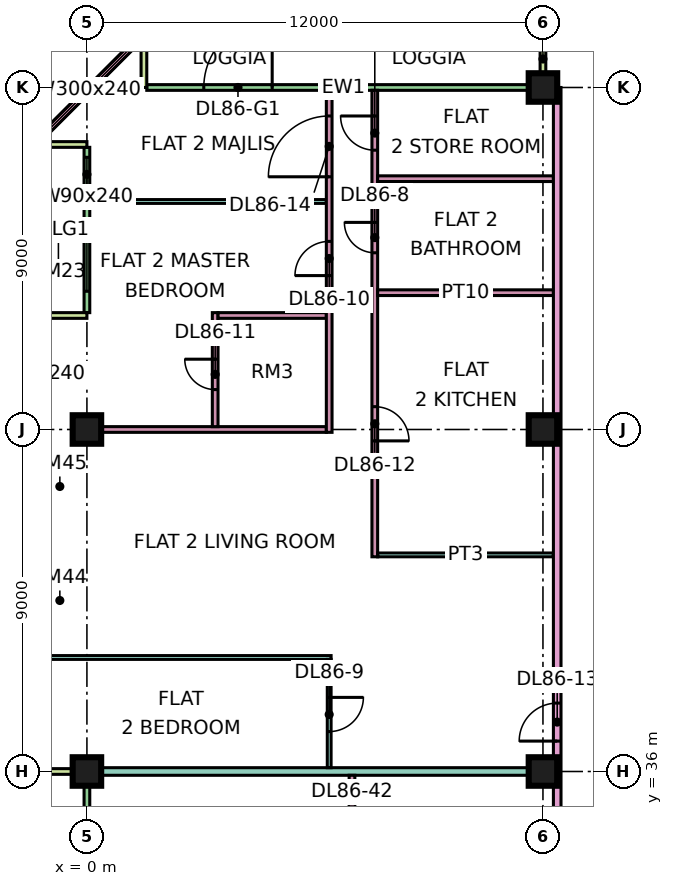
"""IFC4 building model, lengths in metres.
Left out: names, types, materials, properties, quantities, classifications, styles, units other than length and angle.
Written with IfcOpenShell. Run it as: python <this file> out.ifc"""

import sys

from ifc_helpers import new_model, si_unit, direction, frame, frame_2d, origin, origin_2d, place, context, subcontext, project, spatial, rectangle, extrude, element, fill, save


model = new_model("IFC4")
c1 = context("Model", 3, precision=1e-05, world=origin(), true_north=direction((0.0, 1.0)))
c2 = subcontext(c1, "Body", "Model", "MODEL_VIEW")
j1 = project(units=[si_unit("LENGTHUNIT", "METRE"), si_unit("PLANEANGLEUNIT", "RADIAN")], contexts=[c1])
p1 = place(None, origin())
s1 = spatial("IfcSite", under=j1, at=p1, CompositionType="ELEMENT")
p2 = place(p1, origin())
s2 = spatial("IfcBuilding", under=s1, at=p2, CompositionType="ELEMENT")
p3 = place(p2, frame((0.0, 0.0, 368.9)))
s3 = spatial("IfcBuildingStorey", under=s2, at=p3, CompositionType="ELEMENT", Elevation=368.9)
p4 = place(p3, frame((0.0, 36.0, 0.0), z_axis=(0.0, 0.0, 1.0), x_axis=(1.0, 0.0, 0.0)))
e1 = element("IfcColumn", 1, at=p4, inside=s3, PredefinedType="COLUMN", context=c2, shape_type="SweptSolid", body=[
    extrude(rectangle(XDim=0.75, YDim=0.75, at=origin_2d()), origin(), (0.0, 0.0, 1.0), 3.75),
])
p5 = place(p3, frame((0.0, 45.0, 0.0), z_axis=(0.0, 0.0, 1.0), x_axis=(1.0, 0.0, 0.0)))
e2 = element("IfcColumn", 2, at=p5, inside=s3, PredefinedType="COLUMN", context=c2, shape_type="SweptSolid", body=[
    extrude(rectangle(XDim=0.75, YDim=0.75, at=origin_2d()), origin(), (0.0, 0.0, 1.0), 3.75),
])
for number, where, z_axis, x_axis in (
    (3, (12.0, 36.0, 0.0), (0.0, 0.0, 1.0), (1.0, 0.0, 0.0)),
    (4, (12.0, 45.0, 0.0), (0.0, 0.0, 1.0), (1.0, 0.0, 0.0)),
    (5, (12.0, 54.0, 0.0), (0.0, 0.0, 1.0), (1.0, 0.0, 0.0)),
):
    element("IfcColumn", number, at=place(p3, frame(where, z_axis=z_axis, x_axis=x_axis)), inside=s3, PredefinedType="COLUMN", context=c2, shape_type="SweptSolid", body=[
        extrude(rectangle(XDim=0.75, YDim=0.75, at=origin_2d()), origin(), (0.0, 0.0, 1.0), 3.75),
    ])
p6 = place(p3, frame((11.925, 54.0, 0.0), z_axis=(0.0, 0.0, 1.0), x_axis=(-1.0, 0.0, 0.0)))
e6 = element("IfcWall", 6, at=p6, inside=s3, PredefinedType="SOLIDWALL", context=c2, shape_type="SweptSolid", body=[
    extrude(rectangle(XDim=10.35, YDim=0.15, at=frame_2d((5.175, 0.0))), origin(), (0.0, 0.0, 1.0), 3.35),
])
p7 = place(p6, frame((7.05, 0.0, 0.0)))
e7 = element("IfcOpeningElement", 7, at=p7, cuts=e6, PredefinedType="OPENING", context=c2, shape_type="SweptSolid", body=[
    extrude(rectangle(XDim=1.8, YDim=2.4, at=frame_2d((0.9, 1.2))), frame((0.0, 0.085, 0.0), z_axis=(0.0, -1.0, 0.0), x_axis=(1.0, 0.0, 0.0)), (0.0, 0.0, 1.0), 0.17),
])
for number, where, z_axis, x_axis in (
    (8, (12.0, 55.5, 0.0), (0.0, 0.0, 1.0), (0.0, -1.0, 0.0)),
    (9, (1.5, 55.5, 0.0), (0.0, 0.0, 1.0), (0.0, -1.0, 0.0)),
):
    element("IfcWall", number, at=place(p3, frame(where, z_axis=z_axis, x_axis=x_axis)), inside=s3, PredefinedType="SOLIDWALL", context=c2, shape_type="SweptSolid", body=[
        extrude(rectangle(XDim=1.5, YDim=0.15, at=frame_2d((0.75, 0.0))), origin(), (0.0, 0.0, 1.0), 3.35),
    ])
p8 = place(p3, frame((1.553, 55.447, 0.0), z_axis=(0.0, 0.0, 1.0), x_axis=(-0.707106781187, -0.707106781187, 0.0)))
e10 = element("IfcWall", 10, at=p8, inside=s3, PredefinedType="SOLIDWALL", context=c2, shape_type="SweptSolid", body=[
    extrude(rectangle(XDim=4.243, YDim=0.15, at=frame_2d((2.121, 0.0))), origin(), (0.0, 0.0, 1.0), 3.35),
])
p9 = place(p8, frame((0.621, 0.0, 0.45)))
e11 = element("IfcOpeningElement", 11, at=p9, cuts=e10, PredefinedType="OPENING", context=c2, shape_type="SweptSolid", body=[
    extrude(rectangle(XDim=3.0, YDim=2.4, at=frame_2d((1.5, 1.2))), frame((0.0, 0.085, 0.0), z_axis=(0.0, -1.0, 0.0), x_axis=(1.0, 0.0, 0.0)), (0.0, 0.0, 1.0), 0.17),
])
p10 = place(p3, frame((0.0, 52.425, 0.0), z_axis=(0.0, 0.0, 1.0), x_axis=(0.0, -1.0, 0.0)))
e12 = element("IfcWall", 12, at=p10, inside=s3, PredefinedType="SOLIDWALL", context=c2, shape_type="SweptSolid", body=[
    extrude(rectangle(XDim=4.35, YDim=0.15, at=frame_2d((2.175, 0.0))), origin(), (0.0, 0.0, 1.0), 3.35),
])
p11 = place(p10, frame((0.262, 0.0, 0.45)))
e13 = element("IfcOpeningElement", 13, at=p11, cuts=e12, PredefinedType="OPENING", context=c2, shape_type="SweptSolid", body=[
    extrude(rectangle(XDim=0.9, YDim=2.4, at=frame_2d((0.45, 1.2))), frame((0.0, 0.085, 0.0), z_axis=(0.0, -1.0, 0.0), x_axis=(1.0, 0.0, 0.0)), (0.0, 0.0, 1.0), 0.17),
])
p12 = place(p10, frame((1.988, 0.0, 0.45)))
e14 = element("IfcOpeningElement", 14, at=p12, cuts=e12, PredefinedType="OPENING", context=c2, shape_type="SweptSolid", body=[
    extrude(rectangle(XDim=1.8, YDim=2.4, at=frame_2d((0.9, 1.2))), frame((0.0, 0.085, 0.0), z_axis=(0.0, -1.0, 0.0), x_axis=(1.0, 0.0, 0.0)), (0.0, 0.0, 1.0), 0.17),
])
for number, where, z_axis, x_axis in (
    (15, (-1.5, 52.5, 0.0), (0.0, 0.0, 1.0), (1.0, 0.0, 0.0)),
    (16, (-1.5, 48.0, 0.0), (0.0, 0.0, 1.0), (1.0, 0.0, 0.0)),
):
    element("IfcWall", number, at=place(p3, frame(where, z_axis=z_axis, x_axis=x_axis)), inside=s3, PredefinedType="SOLIDWALL", context=c2, shape_type="SweptSolid", body=[
        extrude(rectangle(XDim=1.5, YDim=0.15, at=frame_2d((0.75, 0.0))), origin(), (0.0, 0.0, 1.0), 3.35),
    ])
p13 = place(p3, frame((0.0, 35.925, 0.0), z_axis=(0.0, 0.0, 1.0), x_axis=(0.0, -1.0, 0.0)))
e17 = element("IfcWall", 17, at=p13, inside=s3, PredefinedType="SOLIDWALL", context=c2, shape_type="SweptSolid", body=[
    extrude(rectangle(XDim=11.85, YDim=0.15, at=frame_2d((5.925, 0.0))), origin(), (0.0, 0.0, 1.0), 3.35),
])
p14 = place(p13, frame((2.262, 0.0, 0.0)))
e18 = element("IfcOpeningElement", 18, at=p14, cuts=e17, PredefinedType="OPENING", context=c2, shape_type="SweptSolid", body=[
    extrude(rectangle(XDim=1.8, YDim=2.4, at=frame_2d((0.9, 1.2))), frame((0.0, 0.085, 0.0), z_axis=(0.0, -1.0, 0.0), x_axis=(1.0, 0.0, 0.0)), (0.0, 0.0, 1.0), 0.17),
])
p15 = place(p13, frame((7.188, 0.0, 0.45)))
e19 = element("IfcOpeningElement", 19, at=p15, cuts=e17, PredefinedType="OPENING", context=c2, shape_type="SweptSolid", body=[
    extrude(rectangle(XDim=3.0, YDim=2.4, at=frame_2d((1.5, 1.2))), frame((0.0, 0.085, 0.0), z_axis=(0.0, -1.0, 0.0), x_axis=(1.0, 0.0, 0.0)), (0.0, 0.0, 1.0), 0.17),
])
p16 = place(p3, frame((-1.5, 36.0, 0.0), z_axis=(0.0, 0.0, 1.0), x_axis=(1.0, 0.0, 0.0)))
e20 = element("IfcWall", 20, at=p16, inside=s3, PredefinedType="SOLIDWALL", context=c2, shape_type="SweptSolid", body=[
    extrude(rectangle(XDim=1.5, YDim=0.15, at=frame_2d((0.75, 0.0))), origin(), (0.0, 0.0, 1.0), 3.35),
])
e21 = element("IfcWall", 21, at=p4, inside=s3, PredefinedType="PARTITIONING", context=c2, shape_type="SweptSolid", body=[
    extrude(rectangle(XDim=12.275, YDim=0.2, at=frame_2d((6.137, 0.0))), origin(), (0.0, 0.0, 1.0), 3.35),
])
p17 = place(p3, frame((-1.35, 39.0, 0.0), z_axis=(0.0, 0.0, 1.0), x_axis=(1.0, 0.0, 0.0)))
e22 = element("IfcWall", 22, at=p17, inside=s3, PredefinedType="PARTITIONING", context=c2, shape_type="SweptSolid", body=[
    extrude(rectangle(XDim=7.775, YDim=0.1, at=frame_2d((3.888, 0.0))), origin(), (0.0, 0.0, 1.0), 3.35),
])
e23 = element("IfcWall", 23, at=p5, inside=s3, PredefinedType="PARTITIONING", context=c2, shape_type="SweptSolid", body=[
    extrude(rectangle(XDim=6.3, YDim=0.15, at=frame_2d((3.15, 0.0))), origin(), (0.0, 0.0, 1.0), 3.35),
])
p18 = place(p3, frame((0.074, 51.0, 0.0), z_axis=(0.0, 0.0, 1.0), x_axis=(1.0, 0.0, 0.0)))
e24 = element("IfcWall", 24, at=p18, inside=s3, PredefinedType="PARTITIONING", context=c2, shape_type="SweptSolid", body=[
    extrude(rectangle(XDim=6.226, YDim=0.1, at=frame_2d((3.113, 0.0))), origin(), (0.0, 0.0, 1.0), 3.35),
])
p19 = place(p3, frame((3.375, 45.075, 0.0), z_axis=(0.0, 0.0, 1.0), x_axis=(0.0, 1.0, 0.0)))
e25 = element("IfcWall", 25, at=p19, inside=s3, PredefinedType="PARTITIONING", context=c2, shape_type="SweptSolid", body=[
    extrude(rectangle(XDim=3.0, YDim=0.15, at=frame_2d((1.5, 0.0))), origin(), (0.0, 0.0, 1.0), 3.35),
])
p20 = place(p19, frame((0.975, 0.0, 0.0)))
e26 = element("IfcOpeningElement", 26, at=p20, cuts=e25, PredefinedType="OPENING", context=c2, shape_type="SweptSolid", body=[
    extrude(rectangle(XDim=0.8, YDim=2.1, at=frame_2d((0.4, 1.05))), frame((0.0, 0.085, 0.0), z_axis=(0.0, -1.0, 0.0), x_axis=(1.0, 0.0, 0.0)), (0.0, 0.0, 1.0), 0.17),
])
p21 = place(p3, frame((3.45, 48.0, 0.0), z_axis=(0.0, 0.0, 1.0), x_axis=(1.0, 0.0, 0.0)))
e27 = element("IfcWall", 27, at=p21, inside=s3, PredefinedType="PARTITIONING", context=c2, shape_type="SweptSolid", body=[
    extrude(rectangle(XDim=2.85, YDim=0.15, at=frame_2d((1.425, 0.0))), origin(), (0.0, 0.0, 1.0), 3.35),
])
p22 = place(p3, frame((6.375, 36.1, 0.0), z_axis=(0.0, 0.0, 1.0), x_axis=(0.0, 1.0, 0.0)))
e28 = element("IfcWall", 28, at=p22, inside=s3, PredefinedType="PARTITIONING", context=c2, shape_type="SweptSolid", body=[
    extrude(rectangle(XDim=2.85, YDim=0.1, at=frame_2d((1.425, 0.0))), origin(), (0.0, 0.0, 1.0), 3.35),
])
p23 = place(p22, frame((0.95, 0.0, 0.0)))
e29 = element("IfcOpeningElement", 29, at=p23, cuts=e28, PredefinedType="OPENING", context=c2, shape_type="SweptSolid", body=[
    extrude(rectangle(XDim=0.9, YDim=2.1, at=frame_2d((0.45, 1.05))), frame((0.0, 0.06, 0.0), z_axis=(0.0, -1.0, 0.0), x_axis=(1.0, 0.0, 0.0)), (0.0, 0.0, 1.0), 0.12),
])
p24 = place(p3, frame((6.375, 44.925, 0.0), z_axis=(0.0, 0.0, 1.0), x_axis=(0.0, 1.0, 0.0)))
e30 = element("IfcWall", 30, at=p24, inside=s3, PredefinedType="PARTITIONING", context=c2, shape_type="SweptSolid", body=[
    extrude(rectangle(XDim=9.001, YDim=0.15, at=frame_2d((4.5, 0.0))), origin(), (0.0, 0.0, 1.0), 3.35),
])
p25 = place(p24, frame((4.125, 0.0, 0.0)))
e31 = element("IfcOpeningElement", 31, at=p25, cuts=e30, PredefinedType="OPENING", context=c2, shape_type="SweptSolid", body=[
    extrude(rectangle(XDim=0.9, YDim=2.1, at=frame_2d((0.45, 1.05))), frame((0.0, 0.085, 0.0), z_axis=(0.0, -1.0, 0.0), x_axis=(1.0, 0.0, 0.0)), (0.0, 0.0, 1.0), 0.17),
])
p26 = place(p24, frame((6.725, 0.0, 0.0)))
e32 = element("IfcOpeningElement", 32, at=p26, cuts=e30, PredefinedType="OPENING", context=c2, shape_type="SweptSolid", body=[
    extrude(rectangle(XDim=1.6, YDim=2.1, at=frame_2d((0.8, 1.05))), frame((0.0, 0.085, 0.0), z_axis=(0.0, -1.0, 0.0), x_axis=(1.0, 0.0, 0.0)), (0.0, 0.0, 1.0), 0.17),
])
p27 = place(p3, frame((6.975, 27.55, 0.0), z_axis=(0.0, 0.0, 1.0), x_axis=(0.0, 1.0, 0.0)))
e33 = element("IfcWall", 33, at=p27, inside=s3, PredefinedType="PARTITIONING", context=c2, shape_type="SweptSolid", body=[
    extrude(rectangle(XDim=8.35, YDim=0.15, at=frame_2d((4.175, 0.0))), origin(), (0.0, 0.0, 1.0), 3.35),
])
p28 = place(p27, frame((3.5, 0.0, 0.0)))
e34 = element("IfcOpeningElement", 34, at=p28, cuts=e33, PredefinedType="OPENING", context=c2, shape_type="SweptSolid", body=[
    extrude(rectangle(XDim=0.8, YDim=2.1, at=frame_2d((0.4, 1.05))), frame((0.0, 0.085, 0.0), z_axis=(0.0, -1.0, 0.0), x_axis=(1.0, 0.0, 0.0)), (0.0, 0.0, 1.0), 0.17),
])
p29 = place(p27, frame((0.95, 0.0, 0.0)))
e35 = element("IfcOpeningElement", 35, at=p29, cuts=e33, PredefinedType="OPENING", context=c2, shape_type="SweptSolid", body=[
    extrude(rectangle(XDim=0.9, YDim=2.1, at=frame_2d((0.45, 1.05))), frame((0.0, 0.085, 0.0), z_axis=(0.0, -1.0, 0.0), x_axis=(1.0, 0.0, 0.0)), (0.0, 0.0, 1.0), 0.17),
])
p30 = place(p27, frame((6.35, 0.0, 0.0)))
e36 = element("IfcOpeningElement", 36, at=p30, cuts=e33, PredefinedType="OPENING", context=c2, shape_type="SweptSolid", body=[
    extrude(rectangle(XDim=0.9, YDim=2.1, at=frame_2d((0.45, 1.05))), frame((0.0, 0.085, 0.0), z_axis=(0.0, -1.0, 0.0), x_axis=(1.0, 0.0, 0.0)), (0.0, 0.0, 1.0), 0.17),
])
p31 = place(p3, frame((7.575, 41.65, 0.0), z_axis=(0.0, 0.0, 1.0), x_axis=(0.0, 1.0, 0.0)))
e37 = element("IfcWall", 37, at=p31, inside=s3, PredefinedType="PARTITIONING", context=c2, shape_type="SweptSolid", body=[
    extrude(rectangle(XDim=12.276, YDim=0.15, at=frame_2d((6.138, 0.0))), origin(), (0.0, 0.0, 1.0), 3.35),
])
p32 = place(p31, frame((8.0, 0.0, 0.0)))
e38 = element("IfcOpeningElement", 38, at=p32, cuts=e37, PredefinedType="OPENING", context=c2, shape_type="SweptSolid", body=[
    extrude(rectangle(XDim=0.8, YDim=2.1, at=frame_2d((0.4, 1.05))), frame((0.0, 0.085, 0.0), z_axis=(0.0, -1.0, 0.0), x_axis=(1.0, 0.0, 0.0)), (0.0, 0.0, 1.0), 0.17),
])
p33 = place(p31, frame((3.05, 0.0, 0.0)))
e39 = element("IfcOpeningElement", 39, at=p33, cuts=e37, PredefinedType="OPENING", context=c2, shape_type="SweptSolid", body=[
    extrude(rectangle(XDim=0.9, YDim=2.1, at=frame_2d((0.45, 1.05))), frame((0.0, 0.085, 0.0), z_axis=(0.0, -1.0, 0.0), x_axis=(1.0, 0.0, 0.0)), (0.0, 0.0, 1.0), 0.17),
])
p34 = place(p31, frame((10.7, 0.0, 0.0)))
e40 = element("IfcOpeningElement", 40, at=p34, cuts=e37, PredefinedType="OPENING", context=c2, shape_type="SweptSolid", body=[
    extrude(rectangle(XDim=0.9, YDim=2.1, at=frame_2d((0.45, 1.05))), frame((0.0, 0.085, 0.0), z_axis=(0.0, -1.0, 0.0), x_axis=(1.0, 0.0, 0.0)), (0.0, 0.0, 1.0), 0.17),
])
p35 = place(p3, frame((7.65, 41.7, 0.0), z_axis=(0.0, 0.0, 1.0), x_axis=(1.0, 0.0, 0.0)))
e41 = element("IfcWall", 41, at=p35, inside=s3, PredefinedType="PARTITIONING", context=c2, shape_type="SweptSolid", body=[
    extrude(rectangle(XDim=4.625, YDim=0.1, at=frame_2d((2.312, 0.0))), origin(), (0.0, 0.0, 1.0), 3.35),
])
for number, where, z_axis, x_axis in (
    (42, (7.65, 48.6, 0.0), (0.0, 0.0, 1.0), (1.0, 0.0, 0.0)),
    (43, (7.65, 51.6, 0.0), (0.0, 0.0, 1.0), (1.0, 0.0, 0.0)),
):
    element("IfcWall", number, at=place(p3, frame(where, z_axis=z_axis, x_axis=x_axis)), inside=s3, PredefinedType="PARTITIONING", context=c2, shape_type="SweptSolid", body=[
        extrude(rectangle(XDim=4.625, YDim=0.15, at=frame_2d((2.312, 0.0))), origin(), (0.0, 0.0, 1.0), 3.35),
    ])
p36 = place(p3, frame((12.375, 20.0, 0.0), z_axis=(0.0, 0.0, 1.0), x_axis=(0.0, 1.0, 0.0)))
e44 = element("IfcWall", 44, at=p36, inside=s3, PredefinedType="PARTITIONING", context=c2, shape_type="SweptSolid", body=[
    extrude(rectangle(XDim=34.0, YDim=0.2, at=frame_2d((17.0, 0.0))), origin(), (0.0, 0.0, 1.0), 3.35),
])
p37 = place(p36, frame((16.8, 0.0, 0.0)))
e45 = element("IfcOpeningElement", 45, at=p37, cuts=e44, PredefinedType="OPENING", context=c2, shape_type="SweptSolid", body=[
    extrude(rectangle(XDim=1.0, YDim=2.1, at=frame_2d((0.5, 1.05))), frame((0.0, 0.11, 0.0), z_axis=(0.0, -1.0, 0.0), x_axis=(1.0, 0.0, 0.0)), (0.0, 0.0, 1.0), 0.22),
])
p38 = place(p36, frame((0.6, 0.0, 0.0)))
e46 = element("IfcOpeningElement", 46, at=p38, cuts=e44, PredefinedType="OPENING", context=c2, shape_type="SweptSolid", body=[
    extrude(rectangle(XDim=1.2, YDim=2.1, at=frame_2d((0.6, 1.05))), frame((0.0, 0.11, 0.0), z_axis=(0.0, -1.0, 0.0), x_axis=(1.0, 0.0, 0.0)), (0.0, 0.0, 1.0), 0.22),
])
p39 = place(p36, frame((4.5, 0.0, 0.0)))
e47 = element("IfcOpeningElement", 47, at=p39, cuts=e44, PredefinedType="OPENING", context=c2, shape_type="SweptSolid", body=[
    extrude(rectangle(XDim=1.0, YDim=2.1, at=frame_2d((0.5, 1.05))), frame((0.0, 0.11, 0.0), z_axis=(0.0, -1.0, 0.0), x_axis=(1.0, 0.0, 0.0)), (0.0, 0.0, 1.0), 0.22),
])
p40 = place(p7, frame((1.8, 0.0, 0.0), z_axis=(0.0, 0.0, 1.0), x_axis=(-1.0, 0.0, 0.0)))
e48 = element("IfcDoor", 48, at=p40, inside=s3, OperationType="DOUBLE_DOOR_SINGLE_SWING", PredefinedType="DOOR", context=c2, shape_type="SweptSolid", body=[
    extrude(rectangle(XDim=1.8, YDim=2.4, at=frame_2d((0.9, 1.2))), frame((0.0, 0.025, 0.0), z_axis=(0.0, -1.0, 0.0), x_axis=(1.0, 0.0, 0.0)), (0.0, 0.0, 1.0), 0.05),
])
fill(e7, e48)
p41 = place(p9, origin())
e49 = element("IfcWindow", 49, at=p41, inside=s3, PartitioningType="SINGLE_PANEL", PredefinedType="WINDOW", context=c2, shape_type="SweptSolid", body=[
    extrude(rectangle(XDim=3.0, YDim=2.4, at=frame_2d((1.5, 1.2))), frame((0.0, 0.03, 0.0), z_axis=(0.0, -1.0, 0.0), x_axis=(1.0, 0.0, 0.0)), (0.0, 0.0, 1.0), 0.06),
])
fill(e11, e49)
p42 = place(p11, origin())
e50 = element("IfcWindow", 50, at=p42, inside=s3, PartitioningType="SINGLE_PANEL", PredefinedType="WINDOW", context=c2, shape_type="SweptSolid", body=[
    extrude(rectangle(XDim=0.9, YDim=2.4, at=frame_2d((0.45, 1.2))), frame((0.0, 0.03, 0.0), z_axis=(0.0, -1.0, 0.0), x_axis=(1.0, 0.0, 0.0)), (0.0, 0.0, 1.0), 0.06),
])
fill(e13, e50)
p43 = place(p12, origin())
e51 = element("IfcWindow", 51, at=p43, inside=s3, PartitioningType="SINGLE_PANEL", PredefinedType="WINDOW", context=c2, shape_type="SweptSolid", body=[
    extrude(rectangle(XDim=1.8, YDim=2.4, at=frame_2d((0.9, 1.2))), frame((0.0, 0.03, 0.0), z_axis=(0.0, -1.0, 0.0), x_axis=(1.0, 0.0, 0.0)), (0.0, 0.0, 1.0), 0.06),
])
fill(e14, e51)
p44 = place(p32, frame((0.8, 0.0, 0.0), z_axis=(0.0, 0.0, 1.0), x_axis=(-1.0, 0.0, 0.0)))
e52 = element("IfcDoor", 52, at=p44, inside=s3, OperationType="SINGLE_SWING_RIGHT", PredefinedType="DOOR", context=c2, shape_type="SweptSolid", body=[
    extrude(rectangle(XDim=0.8, YDim=2.1, at=frame_2d((0.4, 1.05))), frame((0.0, 0.025, 0.0), z_axis=(0.0, -1.0, 0.0), x_axis=(1.0, 0.0, 0.0)), (0.0, 0.0, 1.0), 0.05),
])
fill(e38, e52)
p45 = place(p23, origin())
e53 = element("IfcDoor", 53, at=p45, inside=s3, OperationType="SINGLE_SWING_RIGHT", PredefinedType="DOOR", context=c2, shape_type="SweptSolid", body=[
    extrude(rectangle(XDim=0.9, YDim=2.1, at=frame_2d((0.45, 1.05))), frame((0.0, 0.025, 0.0), z_axis=(0.0, -1.0, 0.0), x_axis=(1.0, 0.0, 0.0)), (0.0, 0.0, 1.0), 0.05),
])
fill(e29, e53)
p46 = place(p25, origin())
e54 = element("IfcDoor", 54, at=p46, inside=s3, OperationType="SINGLE_SWING_LEFT", PredefinedType="DOOR", context=c2, shape_type="SweptSolid", body=[
    extrude(rectangle(XDim=0.9, YDim=2.1, at=frame_2d((0.45, 1.05))), frame((0.0, 0.025, 0.0), z_axis=(0.0, -1.0, 0.0), x_axis=(1.0, 0.0, 0.0)), (0.0, 0.0, 1.0), 0.05),
])
fill(e31, e54)
p47 = place(p20, frame((0.8, 0.0, 0.0), z_axis=(0.0, 0.0, 1.0), x_axis=(-1.0, 0.0, 0.0)))
e55 = element("IfcDoor", 55, at=p47, inside=s3, OperationType="SINGLE_SWING_RIGHT", PredefinedType="DOOR", context=c2, shape_type="SweptSolid", body=[
    extrude(rectangle(XDim=0.8, YDim=2.1, at=frame_2d((0.4, 1.05))), frame((0.0, 0.025, 0.0), z_axis=(0.0, -1.0, 0.0), x_axis=(1.0, 0.0, 0.0)), (0.0, 0.0, 1.0), 0.05),
])
fill(e26, e55)
p48 = place(p33, frame((0.9, 0.0, 0.0), z_axis=(0.0, 0.0, 1.0), x_axis=(-1.0, 0.0, 0.0)))
e56 = element("IfcDoor", 56, at=p48, inside=s3, OperationType="SINGLE_SWING_LEFT", PredefinedType="DOOR", context=c2, shape_type="SweptSolid", body=[
    extrude(rectangle(XDim=0.9, YDim=2.1, at=frame_2d((0.45, 1.05))), frame((0.0, 0.025, 0.0), z_axis=(0.0, -1.0, 0.0), x_axis=(1.0, 0.0, 0.0)), (0.0, 0.0, 1.0), 0.05),
])
fill(e39, e56)
p49 = place(p37, origin())
e57 = element("IfcDoor", 57, at=p49, inside=s3, OperationType="SINGLE_SWING_LEFT", PredefinedType="DOOR", context=c2, shape_type="SweptSolid", body=[
    extrude(rectangle(XDim=1.0, YDim=2.1, at=frame_2d((0.5, 1.05))), frame((0.0, 0.025, 0.0), z_axis=(0.0, -1.0, 0.0), x_axis=(1.0, 0.0, 0.0)), (0.0, 0.0, 1.0), 0.05),
])
fill(e45, e57)
p50 = place(p26, origin())
e58 = element("IfcDoor", 58, at=p50, inside=s3, OperationType="DOUBLE_DOOR_SINGLE_SWING", PredefinedType="DOOR", context=c2, shape_type="SweptSolid", body=[
    extrude(rectangle(XDim=1.6, YDim=2.1, at=frame_2d((0.8, 1.05))), frame((0.0, 0.025, 0.0), z_axis=(0.0, -1.0, 0.0), x_axis=(1.0, 0.0, 0.0)), (0.0, 0.0, 1.0), 0.05),
])
fill(e32, e58)
p51 = place(p34, frame((0.9, 0.0, 0.0), z_axis=(0.0, 0.0, 1.0), x_axis=(-1.0, 0.0, 0.0)))
e59 = element("IfcDoor", 59, at=p51, inside=s3, OperationType="SINGLE_SWING_RIGHT", PredefinedType="DOOR", context=c2, shape_type="SweptSolid", body=[
    extrude(rectangle(XDim=0.9, YDim=2.1, at=frame_2d((0.45, 1.05))), frame((0.0, 0.025, 0.0), z_axis=(0.0, -1.0, 0.0), x_axis=(1.0, 0.0, 0.0)), (0.0, 0.0, 1.0), 0.05),
])
fill(e40, e59)
save(model, sys.argv[1])
